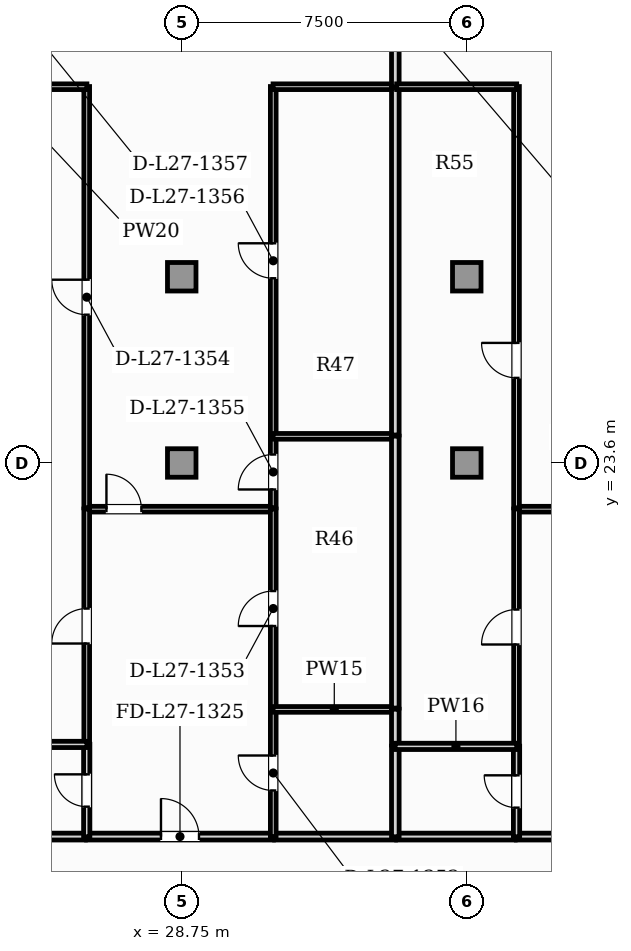
"""IFC4 building model, lengths in metres.
Left out: names, types, materials, properties, quantities, classifications, styles, units other than length and angle.
Written with IfcOpenShell. Run it as: python <this file> out.ifc"""

import sys

from ifc_helpers import new_model, si_unit, direction, frame, frame_2d, origin, origin_2d, place, context, subcontext, project, spatial, rectangle, extrude, element, fill, save


model = new_model("IFC4")
c1 = context("Model", 3, precision=1e-05, world=origin(), true_north=direction((0.0, 1.0)))
c2 = subcontext(c1, "Body", "Model", "MODEL_VIEW")
j1 = project(units=[si_unit("LENGTHUNIT", "METRE"), si_unit("PLANEANGLEUNIT", "RADIAN")], contexts=[c1])
p1 = place(None, origin())
s1 = spatial("IfcSite", under=j1, at=p1, CompositionType="ELEMENT")
p2 = place(p1, origin())
s2 = spatial("IfcBuilding", under=s1, at=p2, CompositionType="ELEMENT")
p3 = place(p2, frame((0.0, 0.0, 111.85)))
s3 = spatial("IfcBuildingStorey", under=s2, at=p3, CompositionType="ELEMENT", Elevation=111.85)
for number, where, z_axis, x_axis in (
    (1, (28.75, 23.6, 0.0), (0.0, 0.0, 1.0), (1.0, 0.0, 0.0)),
    (2, (36.25, 23.6, 0.0), (0.0, 0.0, 1.0), (1.0, 0.0, 0.0)),
    (3, (28.75, 28.5, 0.0), (0.0, 0.0, 1.0), (1.0, 0.0, 0.0)),
    (4, (36.25, 28.5, 0.0), (0.0, 0.0, 1.0), (1.0, 0.0, 0.0)),
):
    element("IfcColumn", number, at=place(p3, frame(where, z_axis=z_axis, x_axis=x_axis)), inside=s3, PredefinedType="COLUMN", context=c2, shape_type="SweptSolid", body=[
        extrude(rectangle(XDim=0.75, YDim=0.75, at=origin_2d()), origin(), (0.0, 0.0, 1.0), 3.85),
    ])
p4 = place(p3, frame((26.245, 13.77, 0.0), z_axis=(0.0, 0.0, 1.0), x_axis=(1.0, 0.0, 0.0)))
e5 = element("IfcWall", 5, at=p4, inside=s3, PredefinedType="PARTITIONING", context=c2, shape_type="SweptSolid", body=[
    extrude(rectangle(XDim=4.918, YDim=0.18, at=frame_2d((2.459, 0.0))), origin(), (0.0, 0.0, 1.0), 3.6),
])
p5 = place(p4, frame((1.959, 0.0, 0.0)))
e6 = element("IfcOpeningElement", 6, at=p5, cuts=e5, PredefinedType="OPENING", context=c2, shape_type="SweptSolid", body=[
    extrude(rectangle(XDim=1.0, YDim=2.15, at=frame_2d((0.5, 1.075))), frame((0.0, 0.1, 0.0), z_axis=(0.0, -1.0, 0.0), x_axis=(1.0, 0.0, 0.0)), (0.0, 0.0, 1.0), 0.2),
])
p6 = place(p3, frame((23.165, 13.77, 0.0), z_axis=(0.0, 0.0, 1.0), x_axis=(1.0, 0.0, 0.0)))
e7 = element("IfcWall", 7, at=p6, inside=s3, PredefinedType="PARTITIONING", context=c2, shape_type="SweptSolid", body=[
    extrude(rectangle(XDim=3.05, YDim=0.18, at=frame_2d((1.525, 0.0))), origin(), (0.0, 0.0, 1.0), 3.6),
])
p7 = place(p3, frame((31.193, 13.77, 0.0), z_axis=(0.0, 0.0, 1.0), x_axis=(1.0, 0.0, 0.0)))
e8 = element("IfcWall", 8, at=p7, inside=s3, PredefinedType="PARTITIONING", context=c2, shape_type="SweptSolid", body=[
    extrude(rectangle(XDim=3.182, YDim=0.18, at=frame_2d((1.591, 0.0))), origin(), (0.0, 0.0, 1.0), 3.6),
])
p8 = place(p3, frame((37.554, 13.77, 0.0), z_axis=(0.0, 0.0, 1.0), x_axis=(1.0, 0.0, 0.0)))
e9 = element("IfcWall", 9, at=p8, inside=s3, PredefinedType="PARTITIONING", context=c2, shape_type="SweptSolid", body=[
    extrude(rectangle(XDim=4.917, YDim=0.18, at=frame_2d((2.459, 0.0))), origin(), (0.0, 0.0, 1.0), 3.6),
])
p9 = place(p8, frame((1.959, 0.0, 0.0)))
e10 = element("IfcOpeningElement", 10, at=p9, cuts=e9, PredefinedType="OPENING", context=c2, shape_type="SweptSolid", body=[
    extrude(rectangle(XDim=1.0, YDim=2.15, at=frame_2d((0.5, 1.075))), frame((0.0, 0.1, 0.0), z_axis=(0.0, -1.0, 0.0), x_axis=(1.0, 0.0, 0.0)), (0.0, 0.0, 1.0), 0.2),
])
p10 = place(p3, frame((34.405, 13.77, 0.0), z_axis=(0.0, 0.0, 1.0), x_axis=(1.0, 0.0, 0.0)))
e11 = element("IfcWall", 11, at=p10, inside=s3, PredefinedType="PARTITIONING", context=c2, shape_type="SweptSolid", body=[
    extrude(rectangle(XDim=3.119, YDim=0.18, at=frame_2d((1.56, 0.0))), origin(), (0.0, 0.0, 1.0), 3.6),
])
p11 = place(p3, frame((26.245, 22.385, 0.0), z_axis=(0.0, 0.0, 1.0), x_axis=(1.0, 0.0, 0.0)))
e12 = element("IfcWall", 12, at=p11, inside=s3, PredefinedType="PARTITIONING", context=c2, shape_type="SweptSolid", body=[
    extrude(rectangle(XDim=4.918, YDim=0.15, at=frame_2d((2.459, 0.0))), origin(), (0.0, 0.0, 1.0), 3.6),
])
p12 = place(p11, frame((0.523, 0.0, 0.0)))
e13 = element("IfcOpeningElement", 13, at=p12, cuts=e12, PredefinedType="OPENING", context=c2, shape_type="SweptSolid", body=[
    extrude(rectangle(XDim=0.92, YDim=2.1, at=frame_2d((0.46, 1.05))), frame((0.0, 0.085, 0.0), z_axis=(0.0, -1.0, 0.0), x_axis=(1.0, 0.0, 0.0)), (0.0, 0.0, 1.0), 0.17),
])
p13 = place(p3, frame((26.25, 13.765, 0.0), z_axis=(0.0, 0.0, 1.0), x_axis=(0.0, 1.0, 0.0)))
e14 = element("IfcWall", 14, at=p13, inside=s3, PredefinedType="PLUMBINGWALL", context=c2, shape_type="SweptSolid", body=[
    extrude(rectangle(XDim=2.435, YDim=0.165, at=frame_2d((1.217, 0.0))), origin(), (0.0, 0.0, 1.0), 3.6),
])
p14 = place(p13, frame((0.792, 0.0, 0.0)))
e15 = element("IfcOpeningElement", 15, at=p14, cuts=e14, PredefinedType="OPENING", context=c2, shape_type="SweptSolid", body=[
    extrude(rectangle(XDim=0.85, YDim=2.1, at=frame_2d((0.425, 1.05))), frame((0.0, 0.093, 0.0), z_axis=(0.0, -1.0, 0.0), x_axis=(1.0, 0.0, 0.0)), (0.0, 0.0, 1.0), 0.185),
])
p15 = place(p3, frame((26.25, 16.23, 0.0), z_axis=(0.0, 0.0, 1.0), x_axis=(0.0, 1.0, 0.0)))
e16 = element("IfcWall", 16, at=p15, inside=s3, PredefinedType="PARTITIONING", context=c2, shape_type="SweptSolid", body=[
    extrude(rectangle(XDim=6.16, YDim=0.15, at=frame_2d((3.08, 0.0))), origin(), (0.0, 0.0, 1.0), 3.6),
])
p16 = place(p15, frame((2.62, 0.0, 0.0)))
e17 = element("IfcOpeningElement", 17, at=p16, cuts=e16, PredefinedType="OPENING", context=c2, shape_type="SweptSolid", body=[
    extrude(rectangle(XDim=0.92, YDim=2.1, at=frame_2d((0.46, 1.05))), frame((0.0, 0.085, 0.0), z_axis=(0.0, -1.0, 0.0), x_axis=(1.0, 0.0, 0.0)), (0.0, 0.0, 1.0), 0.17),
])
p17 = place(p3, frame((31.158, 13.765, 0.0), z_axis=(0.0, 0.0, 1.0), x_axis=(0.0, 1.0, 0.0)))
e18 = element("IfcWall", 18, at=p17, inside=s3, PredefinedType="PARTITIONING", context=c2, shape_type="SweptSolid", body=[
    extrude(rectangle(XDim=3.356, YDim=0.15, at=frame_2d((1.678, 0.0))), origin(), (0.0, 0.0, 1.0), 3.6),
])
p18 = place(p17, frame((1.218, 0.0, 0.0)))
e19 = element("IfcOpeningElement", 19, at=p18, cuts=e18, PredefinedType="OPENING", context=c2, shape_type="SweptSolid", body=[
    extrude(rectangle(XDim=0.92, YDim=2.1, at=frame_2d((0.46, 1.05))), frame((0.0, 0.085, 0.0), z_axis=(0.0, -1.0, 0.0), x_axis=(1.0, 0.0, 0.0)), (0.0, 0.0, 1.0), 0.17),
])
p19 = place(p3, frame((31.158, 17.151, 0.0), z_axis=(0.0, 0.0, 1.0), x_axis=(0.0, 1.0, 0.0)))
e20 = element("IfcWall", 20, at=p19, inside=s3, PredefinedType="PARTITIONING", context=c2, shape_type="SweptSolid", body=[
    extrude(rectangle(XDim=5.239, YDim=0.15, at=frame_2d((2.619, 0.0))), origin(), (0.0, 0.0, 1.0), 3.6),
])
p20 = place(p19, frame((2.159, 0.0, 0.0)))
e21 = element("IfcOpeningElement", 21, at=p20, cuts=e20, PredefinedType="OPENING", context=c2, shape_type="SweptSolid", body=[
    extrude(rectangle(XDim=0.92, YDim=2.1, at=frame_2d((0.46, 1.05))), frame((0.0, 0.085, 0.0), z_axis=(0.0, -1.0, 0.0), x_axis=(1.0, 0.0, 0.0)), (0.0, 0.0, 1.0), 0.17),
])
p21 = place(p3, frame((26.25, 22.419, 0.0), z_axis=(0.0, 0.0, 1.0), x_axis=(0.0, 1.0, 0.0)))
e22 = element("IfcWall", 22, at=p21, inside=s3, PredefinedType="PARTITIONING", context=c2, shape_type="SweptSolid", body=[
    extrude(rectangle(XDim=11.085, YDim=0.15, at=frame_2d((5.543, 0.0))), origin(), (0.0, 0.0, 1.0), 3.6),
])
p22 = place(p21, frame((5.083, 0.0, 0.0)))
e23 = element("IfcOpeningElement", 23, at=p22, cuts=e22, PredefinedType="OPENING", context=c2, shape_type="SweptSolid", body=[
    extrude(rectangle(XDim=0.92, YDim=2.1, at=frame_2d((0.46, 1.05))), frame((0.0, 0.085, 0.0), z_axis=(0.0, -1.0, 0.0), x_axis=(1.0, 0.0, 0.0)), (0.0, 0.0, 1.0), 0.17),
])
p23 = place(p3, frame((23.165, 33.5, 0.0), z_axis=(0.0, 0.0, 1.0), x_axis=(1.0, 0.0, 0.0)))
e24 = element("IfcWall", 24, at=p23, inside=s3, PredefinedType="PARTITIONING", context=c2, shape_type="SweptSolid", body=[
    extrude(rectangle(XDim=3.09, YDim=0.15, at=frame_2d((1.545, 0.0))), origin(), (0.0, 0.0, 1.0), 3.6),
])
p24 = place(p3, frame((31.158, 22.419, 0.0), z_axis=(0.0, 0.0, 1.0), x_axis=(0.0, 1.0, 0.0)))
e25 = element("IfcWall", 25, at=p24, inside=s3, PredefinedType="PARTITIONING", context=c2, shape_type="SweptSolid", body=[
    extrude(rectangle(XDim=1.887, YDim=0.15, at=frame_2d((0.943, 0.0))), origin(), (0.0, 0.0, 1.0), 3.6),
])
p25 = place(p24, frame((0.483, 0.0, 0.0)))
e26 = element("IfcOpeningElement", 26, at=p25, cuts=e25, PredefinedType="OPENING", context=c2, shape_type="SweptSolid", body=[
    extrude(rectangle(XDim=0.92, YDim=2.1, at=frame_2d((0.46, 1.05))), frame((0.0, 0.085, 0.0), z_axis=(0.0, -1.0, 0.0), x_axis=(1.0, 0.0, 0.0)), (0.0, 0.0, 1.0), 0.17),
])
p26 = place(p3, frame((31.158, 24.336, 0.0), z_axis=(0.0, 0.0, 1.0), x_axis=(0.0, 1.0, 0.0)))
e27 = element("IfcWall", 27, at=p26, inside=s3, PredefinedType="PARTITIONING", context=c2, shape_type="SweptSolid", body=[
    extrude(rectangle(XDim=9.169, YDim=0.15, at=frame_2d((4.584, 0.0))), origin(), (0.0, 0.0, 1.0), 3.6),
])
p27 = place(p26, frame((4.125, 0.0, 0.0)))
e28 = element("IfcOpeningElement", 28, at=p27, cuts=e27, PredefinedType="OPENING", context=c2, shape_type="SweptSolid", body=[
    extrude(rectangle(XDim=0.92, YDim=2.1, at=frame_2d((0.46, 1.05))), frame((0.0, 0.085, 0.0), z_axis=(0.0, -1.0, 0.0), x_axis=(1.0, 0.0, 0.0)), (0.0, 0.0, 1.0), 0.17),
])
p28 = place(p3, frame((31.153, 33.5, 0.0), z_axis=(0.0, 0.0, 1.0), x_axis=(1.0, 0.0, 0.0)))
e29 = element("IfcWall", 29, at=p28, inside=s3, PredefinedType="PARTITIONING", context=c2, shape_type="SweptSolid", body=[
    extrude(rectangle(XDim=3.222, YDim=0.15, at=frame_2d((1.611, 0.0))), origin(), (0.0, 0.0, 1.0), 3.6),
])
p29 = place(p3, frame((34.37, 33.495, 0.0), z_axis=(0.0, 0.0, 1.0), x_axis=(0.0, 1.0, 0.0)))
e30 = element("IfcWall", 30, at=p29, inside=s3, PredefinedType="PARTITIONING", context=c2, shape_type="SweptSolid", body=[
    extrude(rectangle(XDim=1.51, YDim=0.2, at=frame_2d((0.755, 0.0))), origin(), (0.0, 0.0, 1.0), 3.6),
])
p30 = place(p3, frame((23.125, 16.195, 0.0), z_axis=(0.0, 0.0, 1.0), x_axis=(1.0, 0.0, 0.0)))
e31 = element("IfcWall", 31, at=p30, inside=s3, PredefinedType="PLUMBINGWALL", context=c2, shape_type="SweptSolid", body=[
    extrude(rectangle(XDim=3.13, YDim=0.165, at=frame_2d((1.565, 0.0))), origin(), (0.0, 0.0, 1.0), 3.6),
])
p31 = place(p3, frame((31.153, 17.116, 0.0), z_axis=(0.0, 0.0, 1.0), x_axis=(1.0, 0.0, 0.0)))
e32 = element("IfcWall", 32, at=p31, inside=s3, PredefinedType="PARTITIONING", context=c2, shape_type="SweptSolid", body=[
    extrude(rectangle(XDim=3.222, YDim=0.15, at=frame_2d((1.611, 0.0))), origin(), (0.0, 0.0, 1.0), 3.6),
])
p32 = place(p3, frame((34.37, 13.765, 0.0), z_axis=(0.0, 0.0, 1.0), x_axis=(0.0, 1.0, 0.0)))
e33 = element("IfcWall", 33, at=p32, inside=s3, PredefinedType="PARTITIONING", context=c2, shape_type="SweptSolid", body=[
    extrude(rectangle(XDim=2.383, YDim=0.2, at=frame_2d((1.192, 0.0))), origin(), (0.0, 0.0, 1.0), 3.6),
])
p33 = place(p3, frame((34.37, 16.178, 0.0), z_axis=(0.0, 0.0, 1.0), x_axis=(0.0, 1.0, 0.0)))
e34 = element("IfcWall", 34, at=p33, inside=s3, PredefinedType="PARTITIONING", context=c2, shape_type="SweptSolid", body=[
    extrude(rectangle(XDim=0.943, YDim=0.2, at=frame_2d((0.471, 0.0))), origin(), (0.0, 0.0, 1.0), 3.6),
])
p34 = place(p3, frame((31.153, 24.301, 0.0), z_axis=(0.0, 0.0, 1.0), x_axis=(1.0, 0.0, 0.0)))
e35 = element("IfcWall", 35, at=p34, inside=s3, PredefinedType="PARTITIONING", context=c2, shape_type="SweptSolid", body=[
    extrude(rectangle(XDim=3.222, YDim=0.15, at=frame_2d((1.611, 0.0))), origin(), (0.0, 0.0, 1.0), 3.6),
])
p35 = place(p3, frame((34.37, 17.151, 0.0), z_axis=(0.0, 0.0, 1.0), x_axis=(0.0, 1.0, 0.0)))
e36 = element("IfcWall", 36, at=p35, inside=s3, PredefinedType="PARTITIONING", context=c2, shape_type="SweptSolid", body=[
    extrude(rectangle(XDim=7.155, YDim=0.2, at=frame_2d((3.578, 0.0))), origin(), (0.0, 0.0, 1.0), 3.6),
])
p36 = place(p3, frame((34.37, 24.336, 0.0), z_axis=(0.0, 0.0, 1.0), x_axis=(0.0, 1.0, 0.0)))
e37 = element("IfcWall", 37, at=p36, inside=s3, PredefinedType="PARTITIONING", context=c2, shape_type="SweptSolid", body=[
    extrude(rectangle(XDim=9.129, YDim=0.2, at=frame_2d((4.564, 0.0))), origin(), (0.0, 0.0, 1.0), 3.6),
])
p37 = place(p3, frame((37.554, 22.385, 0.0), z_axis=(0.0, 0.0, 1.0), x_axis=(1.0, 0.0, 0.0)))
e38 = element("IfcWall", 38, at=p37, inside=s3, PredefinedType="PARTITIONING", context=c2, shape_type="SweptSolid", body=[
    extrude(rectangle(XDim=4.917, YDim=0.15, at=frame_2d((2.459, 0.0))), origin(), (0.0, 0.0, 1.0), 3.6),
])
p38 = place(p37, frame((1.999, 0.0, 0.0)))
e39 = element("IfcOpeningElement", 39, at=p38, cuts=e38, PredefinedType="OPENING", context=c2, shape_type="SweptSolid", body=[
    extrude(rectangle(XDim=0.92, YDim=2.1, at=frame_2d((0.46, 1.05))), frame((0.0, 0.085, 0.0), z_axis=(0.0, -1.0, 0.0), x_axis=(1.0, 0.0, 0.0)), (0.0, 0.0, 1.0), 0.17),
])
p39 = place(p3, frame((37.559, 13.765, 0.0), z_axis=(0.0, 0.0, 1.0), x_axis=(0.0, 1.0, 0.0)))
e40 = element("IfcWall", 40, at=p39, inside=s3, PredefinedType="PLUMBINGWALL", context=c2, shape_type="SweptSolid", body=[
    extrude(rectangle(XDim=2.383, YDim=0.165, at=frame_2d((1.192, 0.0))), origin(), (0.0, 0.0, 1.0), 3.6),
])
p40 = place(p39, frame((0.767, 0.0, 0.0)))
e41 = element("IfcOpeningElement", 41, at=p40, cuts=e40, PredefinedType="OPENING", context=c2, shape_type="SweptSolid", body=[
    extrude(rectangle(XDim=0.85, YDim=2.1, at=frame_2d((0.425, 1.05))), frame((0.0, 0.093, 0.0), z_axis=(0.0, -1.0, 0.0), x_axis=(1.0, 0.0, 0.0)), (0.0, 0.0, 1.0), 0.185),
])
p41 = place(p3, frame((37.559, 16.178, 0.0), z_axis=(0.0, 0.0, 1.0), x_axis=(0.0, 1.0, 0.0)))
e42 = element("IfcWall", 42, at=p41, inside=s3, PredefinedType="PARTITIONING", context=c2, shape_type="SweptSolid", body=[
    extrude(rectangle(XDim=6.211, YDim=0.15, at=frame_2d((3.105, 0.0))), origin(), (0.0, 0.0, 1.0), 3.6),
])
p42 = place(p41, frame((2.646, 0.0, 0.0)))
e43 = element("IfcOpeningElement", 43, at=p42, cuts=e42, PredefinedType="OPENING", context=c2, shape_type="SweptSolid", body=[
    extrude(rectangle(XDim=0.92, YDim=2.1, at=frame_2d((0.46, 1.05))), frame((0.0, 0.085, 0.0), z_axis=(0.0, -1.0, 0.0), x_axis=(1.0, 0.0, 0.0)), (0.0, 0.0, 1.0), 0.17),
])
p43 = place(p3, frame((37.559, 22.419, 0.0), z_axis=(0.0, 0.0, 1.0), x_axis=(0.0, 1.0, 0.0)))
e44 = element("IfcWall", 44, at=p43, inside=s3, PredefinedType="PARTITIONING", context=c2, shape_type="SweptSolid", body=[
    extrude(rectangle(XDim=11.085, YDim=0.15, at=frame_2d((5.543, 0.0))), origin(), (0.0, 0.0, 1.0), 3.6),
])
p44 = place(p43, frame((3.42, 0.0, 0.0)))
e45 = element("IfcOpeningElement", 45, at=p44, cuts=e44, PredefinedType="OPENING", context=c2, shape_type="SweptSolid", body=[
    extrude(rectangle(XDim=0.92, YDim=2.1, at=frame_2d((0.46, 1.05))), frame((0.0, 0.085, 0.0), z_axis=(0.0, -1.0, 0.0), x_axis=(1.0, 0.0, 0.0)), (0.0, 0.0, 1.0), 0.17),
])
p45 = place(p3, frame((34.405, 33.5, 0.0), z_axis=(0.0, 0.0, 1.0), x_axis=(1.0, 0.0, 0.0)))
e46 = element("IfcWall", 46, at=p45, inside=s3, PredefinedType="PARTITIONING", context=c2, shape_type="SweptSolid", body=[
    extrude(rectangle(XDim=3.159, YDim=0.15, at=frame_2d((1.58, 0.0))), origin(), (0.0, 0.0, 1.0), 3.6),
])
p46 = place(p3, frame((34.365, 16.143, 0.0), z_axis=(0.0, 0.0, 1.0), x_axis=(1.0, 0.0, 0.0)))
e47 = element("IfcWall", 47, at=p46, inside=s3, PredefinedType="PLUMBINGWALL", context=c2, shape_type="SweptSolid", body=[
    extrude(rectangle(XDim=3.199, YDim=0.165, at=frame_2d((1.6, 0.0))), origin(), (0.0, 0.0, 1.0), 3.6),
])
p47 = place(p5, origin())
e48 = element("IfcDoor", 48, at=p47, inside=s3, OperationType="SINGLE_SWING_LEFT", PredefinedType="DOOR", context=c2, shape_type="SweptSolid", body=[
    extrude(rectangle(XDim=1.0, YDim=2.15, at=frame_2d((0.5, 1.075))), frame((0.0, 0.025, 0.0), z_axis=(0.0, -1.0, 0.0), x_axis=(1.0, 0.0, 0.0)), (0.0, 0.0, 1.0), 0.05),
])
fill(e6, e48)
p48 = place(p12, origin())
e49 = element("IfcDoor", 49, at=p48, inside=s3, OperationType="SINGLE_SWING_LEFT", PredefinedType="DOOR", context=c2, shape_type="SweptSolid", body=[
    extrude(rectangle(XDim=0.92, YDim=2.1, at=frame_2d((0.46, 1.05))), frame((0.0, 0.025, 0.0), z_axis=(0.0, -1.0, 0.0), x_axis=(1.0, 0.0, 0.0)), (0.0, 0.0, 1.0), 0.05),
])
fill(e13, e49)
p49 = place(p14, origin())
e50 = element("IfcDoor", 50, at=p49, inside=s3, OperationType="SINGLE_SWING_RIGHT", PredefinedType="DOOR", context=c2, shape_type="SweptSolid", body=[
    extrude(rectangle(XDim=0.85, YDim=2.1, at=frame_2d((0.425, 1.05))), frame((0.0, 0.025, 0.0), z_axis=(0.0, -1.0, 0.0), x_axis=(1.0, 0.0, 0.0)), (0.0, 0.0, 1.0), 0.05),
])
fill(e15, e50)
p50 = place(p16, origin())
e51 = element("IfcDoor", 51, at=p50, inside=s3, OperationType="SINGLE_SWING_LEFT", PredefinedType="DOOR", context=c2, shape_type="SweptSolid", body=[
    extrude(rectangle(XDim=0.92, YDim=2.1, at=frame_2d((0.46, 1.05))), frame((0.0, 0.025, 0.0), z_axis=(0.0, -1.0, 0.0), x_axis=(1.0, 0.0, 0.0)), (0.0, 0.0, 1.0), 0.05),
])
fill(e17, e51)
p51 = place(p18, origin())
e52 = element("IfcDoor", 52, at=p51, inside=s3, OperationType="SINGLE_SWING_RIGHT", PredefinedType="DOOR", context=c2, shape_type="SweptSolid", body=[
    extrude(rectangle(XDim=0.92, YDim=2.1, at=frame_2d((0.46, 1.05))), frame((0.0, 0.025, 0.0), z_axis=(0.0, -1.0, 0.0), x_axis=(1.0, 0.0, 0.0)), (0.0, 0.0, 1.0), 0.05),
])
fill(e19, e52)
p52 = place(p20, origin())
e53 = element("IfcDoor", 53, at=p52, inside=s3, OperationType="SINGLE_SWING_LEFT", PredefinedType="DOOR", context=c2, shape_type="SweptSolid", body=[
    extrude(rectangle(XDim=0.92, YDim=2.1, at=frame_2d((0.46, 1.05))), frame((0.0, 0.025, 0.0), z_axis=(0.0, -1.0, 0.0), x_axis=(1.0, 0.0, 0.0)), (0.0, 0.0, 1.0), 0.05),
])
fill(e21, e53)
p53 = place(p22, origin())
e54 = element("IfcDoor", 54, at=p53, inside=s3, OperationType="SINGLE_SWING_RIGHT", PredefinedType="DOOR", context=c2, shape_type="SweptSolid", body=[
    extrude(rectangle(XDim=0.92, YDim=2.1, at=frame_2d((0.46, 1.05))), frame((0.0, 0.025, 0.0), z_axis=(0.0, -1.0, 0.0), x_axis=(1.0, 0.0, 0.0)), (0.0, 0.0, 1.0), 0.05),
])
fill(e23, e54)
p54 = place(p25, origin())
e55 = element("IfcDoor", 55, at=p54, inside=s3, OperationType="SINGLE_SWING_LEFT", PredefinedType="DOOR", context=c2, shape_type="SweptSolid", body=[
    extrude(rectangle(XDim=0.92, YDim=2.1, at=frame_2d((0.46, 1.05))), frame((0.0, 0.025, 0.0), z_axis=(0.0, -1.0, 0.0), x_axis=(1.0, 0.0, 0.0)), (0.0, 0.0, 1.0), 0.05),
])
fill(e26, e55)
p55 = place(p27, origin())
e56 = element("IfcDoor", 56, at=p55, inside=s3, OperationType="SINGLE_SWING_RIGHT", PredefinedType="DOOR", context=c2, shape_type="SweptSolid", body=[
    extrude(rectangle(XDim=0.92, YDim=2.1, at=frame_2d((0.46, 1.05))), frame((0.0, 0.025, 0.0), z_axis=(0.0, -1.0, 0.0), x_axis=(1.0, 0.0, 0.0)), (0.0, 0.0, 1.0), 0.05),
])
fill(e28, e56)
p56 = place(p40, origin())
e57 = element("IfcDoor", 57, at=p56, inside=s3, OperationType="SINGLE_SWING_RIGHT", PredefinedType="DOOR", context=c2, shape_type="SweptSolid", body=[
    extrude(rectangle(XDim=0.85, YDim=2.1, at=frame_2d((0.425, 1.05))), frame((0.0, 0.025, 0.0), z_axis=(0.0, -1.0, 0.0), x_axis=(1.0, 0.0, 0.0)), (0.0, 0.0, 1.0), 0.05),
])
fill(e41, e57)
p57 = place(p42, origin())
e58 = element("IfcDoor", 58, at=p57, inside=s3, OperationType="SINGLE_SWING_LEFT", PredefinedType="DOOR", context=c2, shape_type="SweptSolid", body=[
    extrude(rectangle(XDim=0.92, YDim=2.1, at=frame_2d((0.46, 1.05))), frame((0.0, 0.025, 0.0), z_axis=(0.0, -1.0, 0.0), x_axis=(1.0, 0.0, 0.0)), (0.0, 0.0, 1.0), 0.05),
])
fill(e43, e58)
p58 = place(p44, origin())
e59 = element("IfcDoor", 59, at=p58, inside=s3, OperationType="SINGLE_SWING_RIGHT", PredefinedType="DOOR", context=c2, shape_type="SweptSolid", body=[
    extrude(rectangle(XDim=0.92, YDim=2.1, at=frame_2d((0.46, 1.05))), frame((0.0, 0.025, 0.0), z_axis=(0.0, -1.0, 0.0), x_axis=(1.0, 0.0, 0.0)), (0.0, 0.0, 1.0), 0.05),
])
fill(e45, e59)
save(model, sys.argv[1])
